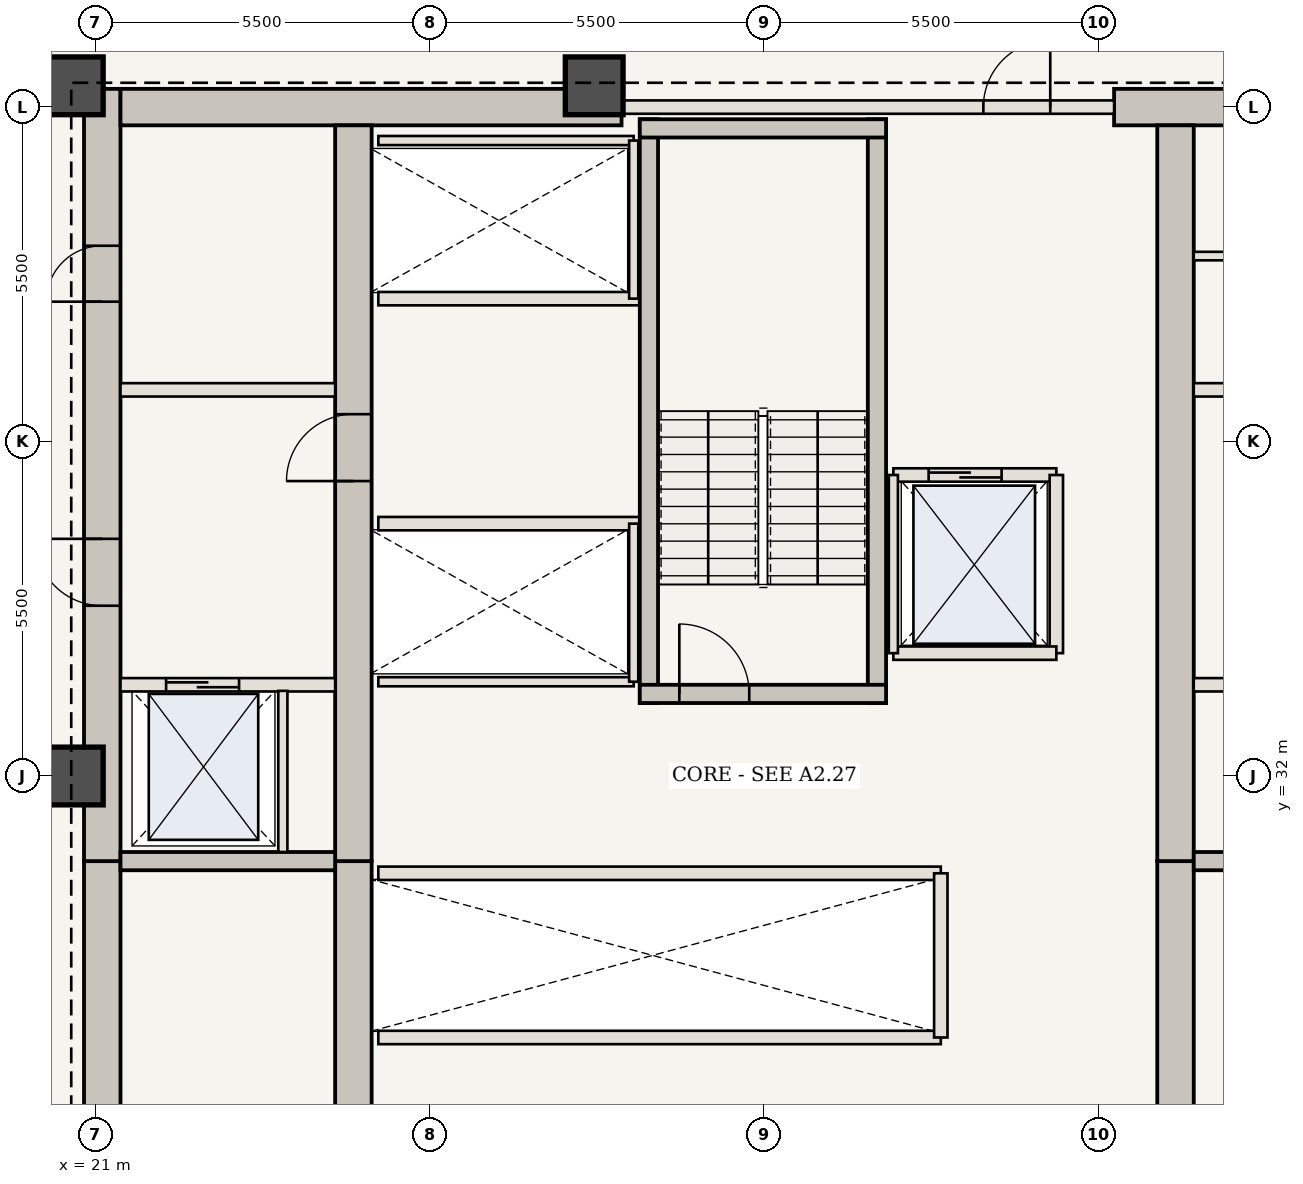
"""IFC4 building model, lengths in metres.
Left out: names, types, materials, properties, quantities, classifications, styles, units other than length and angle.
Written with IfcOpenShell. Run it as: python <this file> out.ifc"""

import sys

from ifc_helpers import new_model, si_unit, direction, frame, frame_2d, origin, origin_2d, place, context, subcontext, project, spatial, rectangle, extrude, element, fill, save


model = new_model("IFC4")
c1 = context("Model", 3, precision=1e-05, world=origin(), true_north=direction((0.0, 1.0)))
c2 = subcontext(c1, "Body", "Model", "MODEL_VIEW")
j1 = project(units=[si_unit("LENGTHUNIT", "METRE"), si_unit("PLANEANGLEUNIT", "RADIAN")], contexts=[c1])
p1 = place(None, origin())
s1 = spatial("IfcSite", under=j1, at=p1, CompositionType="ELEMENT")
p2 = place(p1, origin())
s2 = spatial("IfcBuilding", under=s1, at=p2, CompositionType="ELEMENT")
p3 = place(p2, frame((0.0, 0.0, 110.6)))
s3 = spatial("IfcBuildingStorey", under=s2, at=p3, CompositionType="ELEMENT", Elevation=110.6)
p4 = place(p3, frame((21.11, 20.65, 0.0), z_axis=(0.0, 0.0, 1.0), x_axis=(0.0, 1.0, 0.0)))
e1 = element("IfcWall", 1, at=p4, inside=s3, PredefinedType="SHEAR", context=c2, shape_type="SweptSolid", body=[
    extrude(rectangle(XDim=9.95, YDim=0.6, at=frame_2d((4.975, 0.0))), origin(), (0.0, 0.0, 1.0), 3.85),
])
p5 = place(p4, frame((1.1, 0.0, 0.0)))
e2 = element("IfcOpeningElement", 2, at=p5, cuts=e1, PredefinedType="OPENING", context=c2, shape_type="SweptSolid", body=[
    extrude(rectangle(XDim=1.15, YDim=2.15, at=frame_2d((0.575, 1.075))), frame((0.0, 0.31, 0.0), z_axis=(0.0, -1.0, 0.0), x_axis=(1.0, 0.0, 0.0)), (0.0, 0.0, 1.0), 0.62),
])
p6 = place(p3, frame((21.11, 30.6, 0.0), z_axis=(0.0, 0.0, 1.0), x_axis=(0.0, 1.0, 0.0)))
e3 = element("IfcWall", 3, at=p6, inside=s3, PredefinedType="SHEAR", context=c2, shape_type="SweptSolid", body=[
    extrude(rectangle(XDim=12.7, YDim=0.6, at=frame_2d((6.35, 0.0))), origin(), (0.0, 0.0, 1.0), 3.85),
])
p7 = place(p6, frame((4.2, 0.0, 0.0)))
e4 = element("IfcOpeningElement", 4, at=p7, cuts=e3, PredefinedType="OPENING", context=c2, shape_type="SweptSolid", body=[
    extrude(rectangle(XDim=1.1, YDim=2.15, at=frame_2d((0.55, 1.075))), frame((0.0, 0.31, 0.0), z_axis=(0.0, -1.0, 0.0), x_axis=(1.0, 0.0, 0.0)), (0.0, 0.0, 1.0), 0.62),
])
p8 = place(p6, frame((9.2, 0.0, 0.0)))
e5 = element("IfcOpeningElement", 5, at=p8, cuts=e3, PredefinedType="OPENING", context=c2, shape_type="SweptSolid", body=[
    extrude(rectangle(XDim=0.92, YDim=2.1, at=frame_2d((0.46, 1.05))), frame((0.0, 0.31, 0.0), z_axis=(0.0, -1.0, 0.0), x_axis=(1.0, 0.0, 0.0)), (0.0, 0.0, 1.0), 0.62),
])
p9 = place(p3, frame((21.41, 43.0, 0.0), z_axis=(0.0, 0.0, 1.0), x_axis=(1.0, 0.0, 0.0)))
e6 = element("IfcWall", 6, at=p9, inside=s3, PredefinedType="SHEAR", context=c2, shape_type="SweptSolid", body=[
    extrude(rectangle(XDim=8.24, YDim=0.6, at=frame_2d((4.12, 0.0))), origin(), (0.0, 0.0, 1.0), 3.85),
])
p10 = place(p3, frame((37.75, 43.0, 0.0), z_axis=(0.0, 0.0, 1.0), x_axis=(1.0, 0.0, 0.0)))
e7 = element("IfcWall", 7, at=p10, inside=s3, PredefinedType="SHEAR", context=c2, shape_type="SweptSolid", body=[
    extrude(rectangle(XDim=4.84, YDim=0.6, at=frame_2d((2.42, 0.0))), origin(), (0.0, 0.0, 1.0), 3.85),
])
p11 = place(p3, frame((25.24, 21.25, 0.0), z_axis=(0.0, 0.0, 1.0), x_axis=(0.0, 1.0, 0.0)))
e8 = element("IfcWall", 8, at=p11, inside=s3, PredefinedType="SHEAR", context=c2, shape_type="SweptSolid", body=[
    extrude(rectangle(XDim=9.35, YDim=0.6, at=frame_2d((4.675, 0.0))), origin(), (0.0, 0.0, 1.0), 3.85),
])
p12 = place(p3, frame((25.24, 30.6, 0.0), z_axis=(0.0, 0.0, 1.0), x_axis=(0.0, 1.0, 0.0)))
e9 = element("IfcWall", 9, at=p12, inside=s3, PredefinedType="SHEAR", context=c2, shape_type="SweptSolid", body=[
    extrude(rectangle(XDim=12.1, YDim=0.6, at=frame_2d((6.05, 0.0))), origin(), (0.0, 0.0, 1.0), 3.85),
])
p13 = place(p12, frame((6.25, 0.0, 0.0)))
e10 = element("IfcOpeningElement", 10, at=p13, cuts=e9, PredefinedType="OPENING", context=c2, shape_type="SweptSolid", body=[
    extrude(rectangle(XDim=1.1, YDim=2.15, at=frame_2d((0.55, 1.075))), frame((0.0, 0.31, 0.0), z_axis=(0.0, -1.0, 0.0), x_axis=(1.0, 0.0, 0.0)), (0.0, 0.0, 1.0), 0.62),
])
p14 = place(p3, frame((38.76, 21.25, 0.0), z_axis=(0.0, 0.0, 1.0), x_axis=(0.0, 1.0, 0.0)))
e11 = element("IfcWall", 11, at=p14, inside=s3, PredefinedType="SHEAR", context=c2, shape_type="SweptSolid", body=[
    extrude(rectangle(XDim=9.35, YDim=0.6, at=frame_2d((4.675, 0.0))), origin(), (0.0, 0.0, 1.0), 3.85),
])
p15 = place(p3, frame((38.76, 30.6, 0.0), z_axis=(0.0, 0.0, 1.0), x_axis=(0.0, 1.0, 0.0)))
e12 = element("IfcWall", 12, at=p15, inside=s3, PredefinedType="SHEAR", context=c2, shape_type="SweptSolid", body=[
    extrude(rectangle(XDim=12.1, YDim=0.6, at=frame_2d((6.05, 0.0))), origin(), (0.0, 0.0, 1.0), 3.85),
])
for number, where, z_axis, x_axis in (
    (13, (29.2, 43.35, 0.0), (0.0, 0.0, 1.0), (1.0, 0.0, 0.0)),
    (14, (20.65, 43.35, 0.0), (0.0, 0.0, 1.0), (1.0, 0.0, 0.0)),
    (15, (20.65, 32.0, 0.0), (0.0, 0.0, 1.0), (1.0, 0.0, 0.0)),
):
    element("IfcColumn", number, at=place(p3, frame(where, z_axis=z_axis, x_axis=x_axis)), inside=s3, PredefinedType="COLUMN", context=c2, shape_type="SweptSolid", body=[
        extrude(rectangle(XDim=0.95, YDim=0.95, at=origin_2d()), origin(), (0.0, 0.0, 1.0), 3.85),
    ])
for number, where, z_axis, x_axis in (
    (16, (21.41, 30.6, 0.0), (0.0, 0.0, 1.0), (1.0, 0.0, 0.0)),
    (17, (39.06, 30.6, 0.0), (0.0, 0.0, 1.0), (1.0, 0.0, 0.0)),
):
    element("IfcWall", number, at=place(p3, frame(where, z_axis=z_axis, x_axis=x_axis)), inside=s3, PredefinedType="SHEAR", context=c2, shape_type="SweptSolid", body=[
        extrude(rectangle(XDim=3.53, YDim=0.3, at=frame_2d((1.765, 0.0))), origin(), (0.0, 0.0, 1.0), 3.43),
    ])
p16 = place(p3, frame((21.41, 33.5, 0.0), z_axis=(0.0, 0.0, 1.0), x_axis=(1.0, 0.0, 0.0)))
e18 = element("IfcWall", 18, at=p16, inside=s3, PredefinedType="STANDARD", context=c2, shape_type="SweptSolid", body=[
    extrude(rectangle(XDim=3.53, YDim=0.22, at=frame_2d((1.765, 0.0))), origin(), (0.0, 0.0, 1.0), 3.43),
])
p17 = place(p16, frame((0.75, 0.0, 0.0)))
e19 = element("IfcOpeningElement", 19, at=p17, cuts=e18, PredefinedType="OPENING", context=c2, shape_type="SweptSolid", body=[
    extrude(rectangle(XDim=1.2, YDim=2.2, at=frame_2d((0.6, 1.1))), frame((0.0, 0.12, 0.0), z_axis=(0.0, -1.0, 0.0), x_axis=(1.0, 0.0, 0.0)), (0.0, 0.0, 1.0), 0.24),
])
p18 = place(p3, frame((24.08, 30.75, 0.0), z_axis=(0.0, 0.0, 1.0), x_axis=(0.0, 1.0, 0.0)))
e20 = element("IfcWall", 20, at=p18, inside=s3, PredefinedType="STANDARD", context=c2, shape_type="SweptSolid", body=[
    extrude(rectangle(XDim=2.65, YDim=0.15, at=frame_2d((1.325, 0.0))), origin(), (0.0, 0.0, 1.0), 3.43),
])
p19 = place(p3, frame((39.06, 33.5, 0.0), z_axis=(0.0, 0.0, 1.0), x_axis=(1.0, 0.0, 0.0)))
e21 = element("IfcWall", 21, at=p19, inside=s3, PredefinedType="STANDARD", context=c2, shape_type="SweptSolid", body=[
    extrude(rectangle(XDim=3.53, YDim=0.22, at=frame_2d((1.765, 0.0))), origin(), (0.0, 0.0, 1.0), 3.43),
])
p20 = place(p19, frame((1.55, 0.0, 0.0)))
e22 = element("IfcOpeningElement", 22, at=p20, cuts=e21, PredefinedType="OPENING", context=c2, shape_type="SweptSolid", body=[
    extrude(rectangle(XDim=1.2, YDim=2.2, at=frame_2d((0.6, 1.1))), frame((0.0, 0.12, 0.0), z_axis=(0.0, -1.0, 0.0), x_axis=(1.0, 0.0, 0.0)), (0.0, 0.0, 1.0), 0.24),
])
for number, where, z_axis, x_axis in (
    (23, (21.41, 38.35, 0.0), (0.0, 0.0, 1.0), (1.0, 0.0, 0.0)),
    (24, (39.06, 38.35, 0.0), (0.0, 0.0, 1.0), (1.0, 0.0, 0.0)),
):
    element("IfcWall", number, at=place(p3, frame(where, z_axis=z_axis, x_axis=x_axis)), inside=s3, PredefinedType="STANDARD", context=c2, shape_type="SweptSolid", body=[
        extrude(rectangle(XDim=3.53, YDim=0.22, at=frame_2d((1.765, 0.0))), origin(), (0.0, 0.0, 1.0), 3.43),
    ])
p21 = place(p3, frame((39.06, 40.55, 0.0), z_axis=(0.0, 0.0, 1.0), x_axis=(1.0, 0.0, 0.0)))
e25 = element("IfcWall", 25, at=p21, inside=s3, PredefinedType="STANDARD", context=c2, shape_type="SweptSolid", body=[
    extrude(rectangle(XDim=3.53, YDim=0.14, at=frame_2d((1.765, 0.0))), origin(), (0.0, 0.0, 1.0), 3.43),
])
for number, where, z_axis, x_axis in (
    (26, (25.65, 27.7, 0.0), (0.0, 0.0, 1.0), (1.0, 0.0, 0.0)),
    (27, (25.65, 30.4, 0.0), (0.0, 0.0, 1.0), (1.0, 0.0, 0.0)),
):
    element("IfcWall", number, at=place(p3, frame(where, z_axis=z_axis, x_axis=x_axis)), inside=s3, PredefinedType="STANDARD", context=c2, shape_type="SweptSolid", body=[
        extrude(rectangle(XDim=9.25, YDim=0.22, at=frame_2d((4.625, 0.0))), origin(), (0.0, 0.0, 1.0), 3.43),
    ])
p22 = place(p3, frame((34.9, 27.7, 0.0), z_axis=(0.0, 0.0, 1.0), x_axis=(0.0, 1.0, 0.0)))
e28 = element("IfcWall", 28, at=p22, inside=s3, PredefinedType="STANDARD", context=c2, shape_type="SweptSolid", body=[
    extrude(rectangle(XDim=2.7, YDim=0.22, at=frame_2d((1.35, 0.0))), origin(), (0.0, 0.0, 1.0), 3.43),
])
p23 = place(p3, frame((25.65, 36.15, 0.0), z_axis=(0.0, 0.0, 1.0), x_axis=(1.0, 0.0, 0.0)))
e29 = element("IfcWall", 29, at=p23, inside=s3, PredefinedType="STANDARD", context=c2, shape_type="SweptSolid", body=[
    extrude(rectangle(XDim=4.3, YDim=0.22, at=frame_2d((2.15, 0.0))), origin(), (0.0, 0.0, 1.0), 3.43),
])
p24 = place(p3, frame((25.65, 33.55, 0.0), z_axis=(0.0, 0.0, 1.0), x_axis=(1.0, 0.0, 0.0)))
e30 = element("IfcWall", 30, at=p24, inside=s3, PredefinedType="STANDARD", context=c2, shape_type="SweptSolid", body=[
    extrude(rectangle(XDim=4.2, YDim=0.15, at=frame_2d((2.1, 0.0))), origin(), (0.0, 0.0, 1.0), 3.43),
])
p25 = place(p3, frame((29.85, 33.55, 0.0), z_axis=(0.0, 0.0, 1.0), x_axis=(0.0, 1.0, 0.0)))
e31 = element("IfcWall", 31, at=p25, inside=s3, PredefinedType="STANDARD", context=c2, shape_type="SweptSolid", body=[
    extrude(rectangle(XDim=2.6, YDim=0.15, at=frame_2d((1.3, 0.0))), origin(), (0.0, 0.0, 1.0), 3.43),
])
p26 = place(p3, frame((25.65, 39.85, 0.0), z_axis=(0.0, 0.0, 1.0), x_axis=(1.0, 0.0, 0.0)))
e32 = element("IfcWall", 32, at=p26, inside=s3, PredefinedType="STANDARD", context=c2, shape_type="SweptSolid", body=[
    extrude(rectangle(XDim=4.3, YDim=0.22, at=frame_2d((2.15, 0.0))), origin(), (0.0, 0.0, 1.0), 3.43),
])
p27 = place(p3, frame((25.65, 42.45, 0.0), z_axis=(0.0, 0.0, 1.0), x_axis=(1.0, 0.0, 0.0)))
e33 = element("IfcWall", 33, at=p27, inside=s3, PredefinedType="STANDARD", context=c2, shape_type="SweptSolid", body=[
    extrude(rectangle(XDim=4.2, YDim=0.15, at=frame_2d((2.1, 0.0))), origin(), (0.0, 0.0, 1.0), 3.43),
])
p28 = place(p3, frame((29.85, 39.85, 0.0), z_axis=(0.0, 0.0, 1.0), x_axis=(0.0, 1.0, 0.0)))
e34 = element("IfcWall", 34, at=p28, inside=s3, PredefinedType="STANDARD", context=c2, shape_type="SweptSolid", body=[
    extrude(rectangle(XDim=2.6, YDim=0.15, at=frame_2d((1.3, 0.0))), origin(), (0.0, 0.0, 1.0), 3.43),
])
for number, where, z_axis, x_axis in (
    (35, (30.1, 33.2, 0.0), (0.0, 0.0, 1.0), (0.0, 1.0, 0.0)),
    (36, (33.85, 33.2, 0.0), (0.0, 0.0, 1.0), (0.0, 1.0, 0.0)),
):
    element("IfcWall", number, at=place(p3, frame(where, z_axis=z_axis, x_axis=x_axis)), inside=s3, PredefinedType="SHEAR", context=c2, shape_type="SweptSolid", body=[
        extrude(rectangle(XDim=9.6, YDim=0.3, at=frame_2d((4.8, 0.0))), origin(), (0.0, 0.0, 1.0), 3.43),
    ])
p29 = place(p3, frame((29.95, 33.35, 0.0), z_axis=(0.0, 0.0, 1.0), x_axis=(1.0, 0.0, 0.0)))
e37 = element("IfcWall", 37, at=p29, inside=s3, PredefinedType="SHEAR", context=c2, shape_type="SweptSolid", body=[
    extrude(rectangle(XDim=4.05, YDim=0.3, at=frame_2d((2.025, 0.0))), origin(), (0.0, 0.0, 1.0), 3.43),
])
p30 = place(p29, frame((0.65, 0.0, 0.0)))
e38 = element("IfcOpeningElement", 38, at=p30, cuts=e37, PredefinedType="OPENING", context=c2, shape_type="SweptSolid", body=[
    extrude(rectangle(XDim=1.15, YDim=2.15, at=frame_2d((0.575, 1.075))), frame((0.0, 0.16, 0.0), z_axis=(0.0, -1.0, 0.0), x_axis=(1.0, 0.0, 0.0)), (0.0, 0.0, 1.0), 0.32),
])
p31 = place(p3, frame((29.95, 42.65, 0.0), z_axis=(0.0, 0.0, 1.0), x_axis=(1.0, 0.0, 0.0)))
e39 = element("IfcWall", 39, at=p31, inside=s3, PredefinedType="SHEAR", context=c2, shape_type="SweptSolid", body=[
    extrude(rectangle(XDim=4.05, YDim=0.3, at=frame_2d((2.025, 0.0))), origin(), (0.0, 0.0, 1.0), 3.43),
])
p32 = place(p3, frame((29.65, 43.0, 0.0), z_axis=(0.0, 0.0, 1.0), x_axis=(1.0, 0.0, 0.0)))
e40 = element("IfcWall", 40, at=p32, inside=s3, PredefinedType="STANDARD", context=c2, shape_type="SweptSolid", body=[
    extrude(rectangle(XDim=8.1, YDim=0.22, at=frame_2d((4.05, 0.0))), origin(), (0.0, 0.0, 1.0), 3.43),
])
p33 = place(p32, frame((5.95, 0.0, 0.0)))
e41 = element("IfcOpeningElement", 41, at=p33, cuts=e40, PredefinedType="OPENING", context=c2, shape_type="SweptSolid", body=[
    extrude(rectangle(XDim=1.1, YDim=2.15, at=frame_2d((0.55, 1.075))), frame((0.0, 0.12, 0.0), z_axis=(0.0, -1.0, 0.0), x_axis=(1.0, 0.0, 0.0)), (0.0, 0.0, 1.0), 0.24),
])
p34 = place(p3, frame((34.12, 36.95, 0.0), z_axis=(0.0, 0.0, 1.0), x_axis=(1.0, 0.0, 0.0)))
e42 = element("IfcWall", 42, at=p34, inside=s3, PredefinedType="STANDARD", context=c2, shape_type="SweptSolid", body=[
    extrude(rectangle(XDim=2.68, YDim=0.22, at=frame_2d((1.34, 0.0))), origin(), (0.0, 0.0, 1.0), 3.43),
])
p35 = place(p34, frame((0.58, 0.0, 0.0)))
e43 = element("IfcOpeningElement", 43, at=p35, cuts=e42, PredefinedType="OPENING", context=c2, shape_type="SweptSolid", body=[
    extrude(rectangle(XDim=1.2, YDim=2.2, at=frame_2d((0.6, 1.1))), frame((0.0, 0.12, 0.0), z_axis=(0.0, -1.0, 0.0), x_axis=(1.0, 0.0, 0.0)), (0.0, 0.0, 1.0), 0.24),
])
p36 = place(p3, frame((36.8, 34.02, 0.0), z_axis=(0.0, 0.0, 1.0), x_axis=(0.0, 1.0, 0.0)))
e44 = element("IfcWall", 44, at=p36, inside=s3, PredefinedType="STANDARD", context=c2, shape_type="SweptSolid", body=[
    extrude(rectangle(XDim=2.93, YDim=0.22, at=frame_2d((1.465, 0.0))), origin(), (0.0, 0.0, 1.0), 3.43),
])
p37 = place(p3, frame((34.12, 34.02, 0.0), z_axis=(0.0, 0.0, 1.0), x_axis=(1.0, 0.0, 0.0)))
e45 = element("IfcWall", 45, at=p37, inside=s3, PredefinedType="STANDARD", context=c2, shape_type="SweptSolid", body=[
    extrude(rectangle(XDim=2.68, YDim=0.22, at=frame_2d((1.34, 0.0))), origin(), (0.0, 0.0, 1.0), 3.43),
])
p38 = place(p3, frame((34.12, 34.02, 0.0), z_axis=(0.0, 0.0, 1.0), x_axis=(0.0, 1.0, 0.0)))
e46 = element("IfcWall", 46, at=p38, inside=s3, PredefinedType="STANDARD", context=c2, shape_type="SweptSolid", body=[
    extrude(rectangle(XDim=2.93, YDim=0.15, at=frame_2d((1.465, 0.0))), origin(), (0.0, 0.0, 1.0), 3.43),
])
p39 = place(p7, origin())
e47 = element("IfcDoor", 47, at=p39, inside=s3, OperationType="SINGLE_SWING_RIGHT", PredefinedType="DOOR", context=c2, shape_type="SweptSolid", body=[
    extrude(rectangle(XDim=1.1, YDim=2.15, at=frame_2d((0.55, 1.075))), frame((0.0, 0.025, 0.0), z_axis=(0.0, -1.0, 0.0), x_axis=(1.0, 0.0, 0.0)), (0.0, 0.0, 1.0), 0.05),
])
fill(e4, e47)
p40 = place(p13, origin())
e48 = element("IfcDoor", 48, at=p40, inside=s3, OperationType="SINGLE_SWING_LEFT", PredefinedType="DOOR", context=c2, shape_type="SweptSolid", body=[
    extrude(rectangle(XDim=1.1, YDim=2.15, at=frame_2d((0.55, 1.075))), frame((0.0, 0.025, 0.0), z_axis=(0.0, -1.0, 0.0), x_axis=(1.0, 0.0, 0.0)), (0.0, 0.0, 1.0), 0.05),
])
fill(e10, e48)
p41 = place(p8, origin())
e49 = element("IfcDoor", 49, at=p41, inside=s3, OperationType="SINGLE_SWING_LEFT", PredefinedType="DOOR", context=c2, shape_type="SweptSolid", body=[
    extrude(rectangle(XDim=0.92, YDim=2.1, at=frame_2d((0.46, 1.05))), frame((0.0, 0.025, 0.0), z_axis=(0.0, -1.0, 0.0), x_axis=(1.0, 0.0, 0.0)), (0.0, 0.0, 1.0), 0.05),
])
fill(e5, e49)
p42 = place(p17, origin())
e50 = element("IfcDoor", 50, at=p42, inside=s3, OperationType="DOUBLE_DOOR_SLIDING", PredefinedType="DOOR", context=c2, shape_type="SweptSolid", body=[
    extrude(rectangle(XDim=1.2, YDim=2.2, at=frame_2d((0.6, 1.1))), frame((0.0, 0.025, 0.0), z_axis=(0.0, -1.0, 0.0), x_axis=(1.0, 0.0, 0.0)), (0.0, 0.0, 1.0), 0.05),
])
fill(e19, e50)
p43 = place(p30, origin())
e51 = element("IfcDoor", 51, at=p43, inside=s3, OperationType="SINGLE_SWING_LEFT", PredefinedType="DOOR", context=c2, shape_type="SweptSolid", body=[
    extrude(rectangle(XDim=1.15, YDim=2.15, at=frame_2d((0.575, 1.075))), frame((0.0, 0.025, 0.0), z_axis=(0.0, -1.0, 0.0), x_axis=(1.0, 0.0, 0.0)), (0.0, 0.0, 1.0), 0.05),
])
fill(e38, e51)
p44 = place(p33, origin())
e52 = element("IfcDoor", 52, at=p44, inside=s3, OperationType="SINGLE_SWING_RIGHT", PredefinedType="DOOR", context=c2, shape_type="SweptSolid", body=[
    extrude(rectangle(XDim=1.1, YDim=2.15, at=frame_2d((0.55, 1.075))), frame((0.0, 0.025, 0.0), z_axis=(0.0, -1.0, 0.0), x_axis=(1.0, 0.0, 0.0)), (0.0, 0.0, 1.0), 0.05),
])
fill(e41, e52)
p45 = place(p35, origin())
e53 = element("IfcDoor", 53, at=p45, inside=s3, OperationType="DOUBLE_DOOR_SLIDING", PredefinedType="DOOR", context=c2, shape_type="SweptSolid", body=[
    extrude(rectangle(XDim=1.2, YDim=2.2, at=frame_2d((0.6, 1.1))), frame((0.0, 0.025, 0.0), z_axis=(0.0, -1.0, 0.0), x_axis=(1.0, 0.0, 0.0)), (0.0, 0.0, 1.0), 0.05),
])
fill(e43, e53)
save(model, sys.argv[1])
